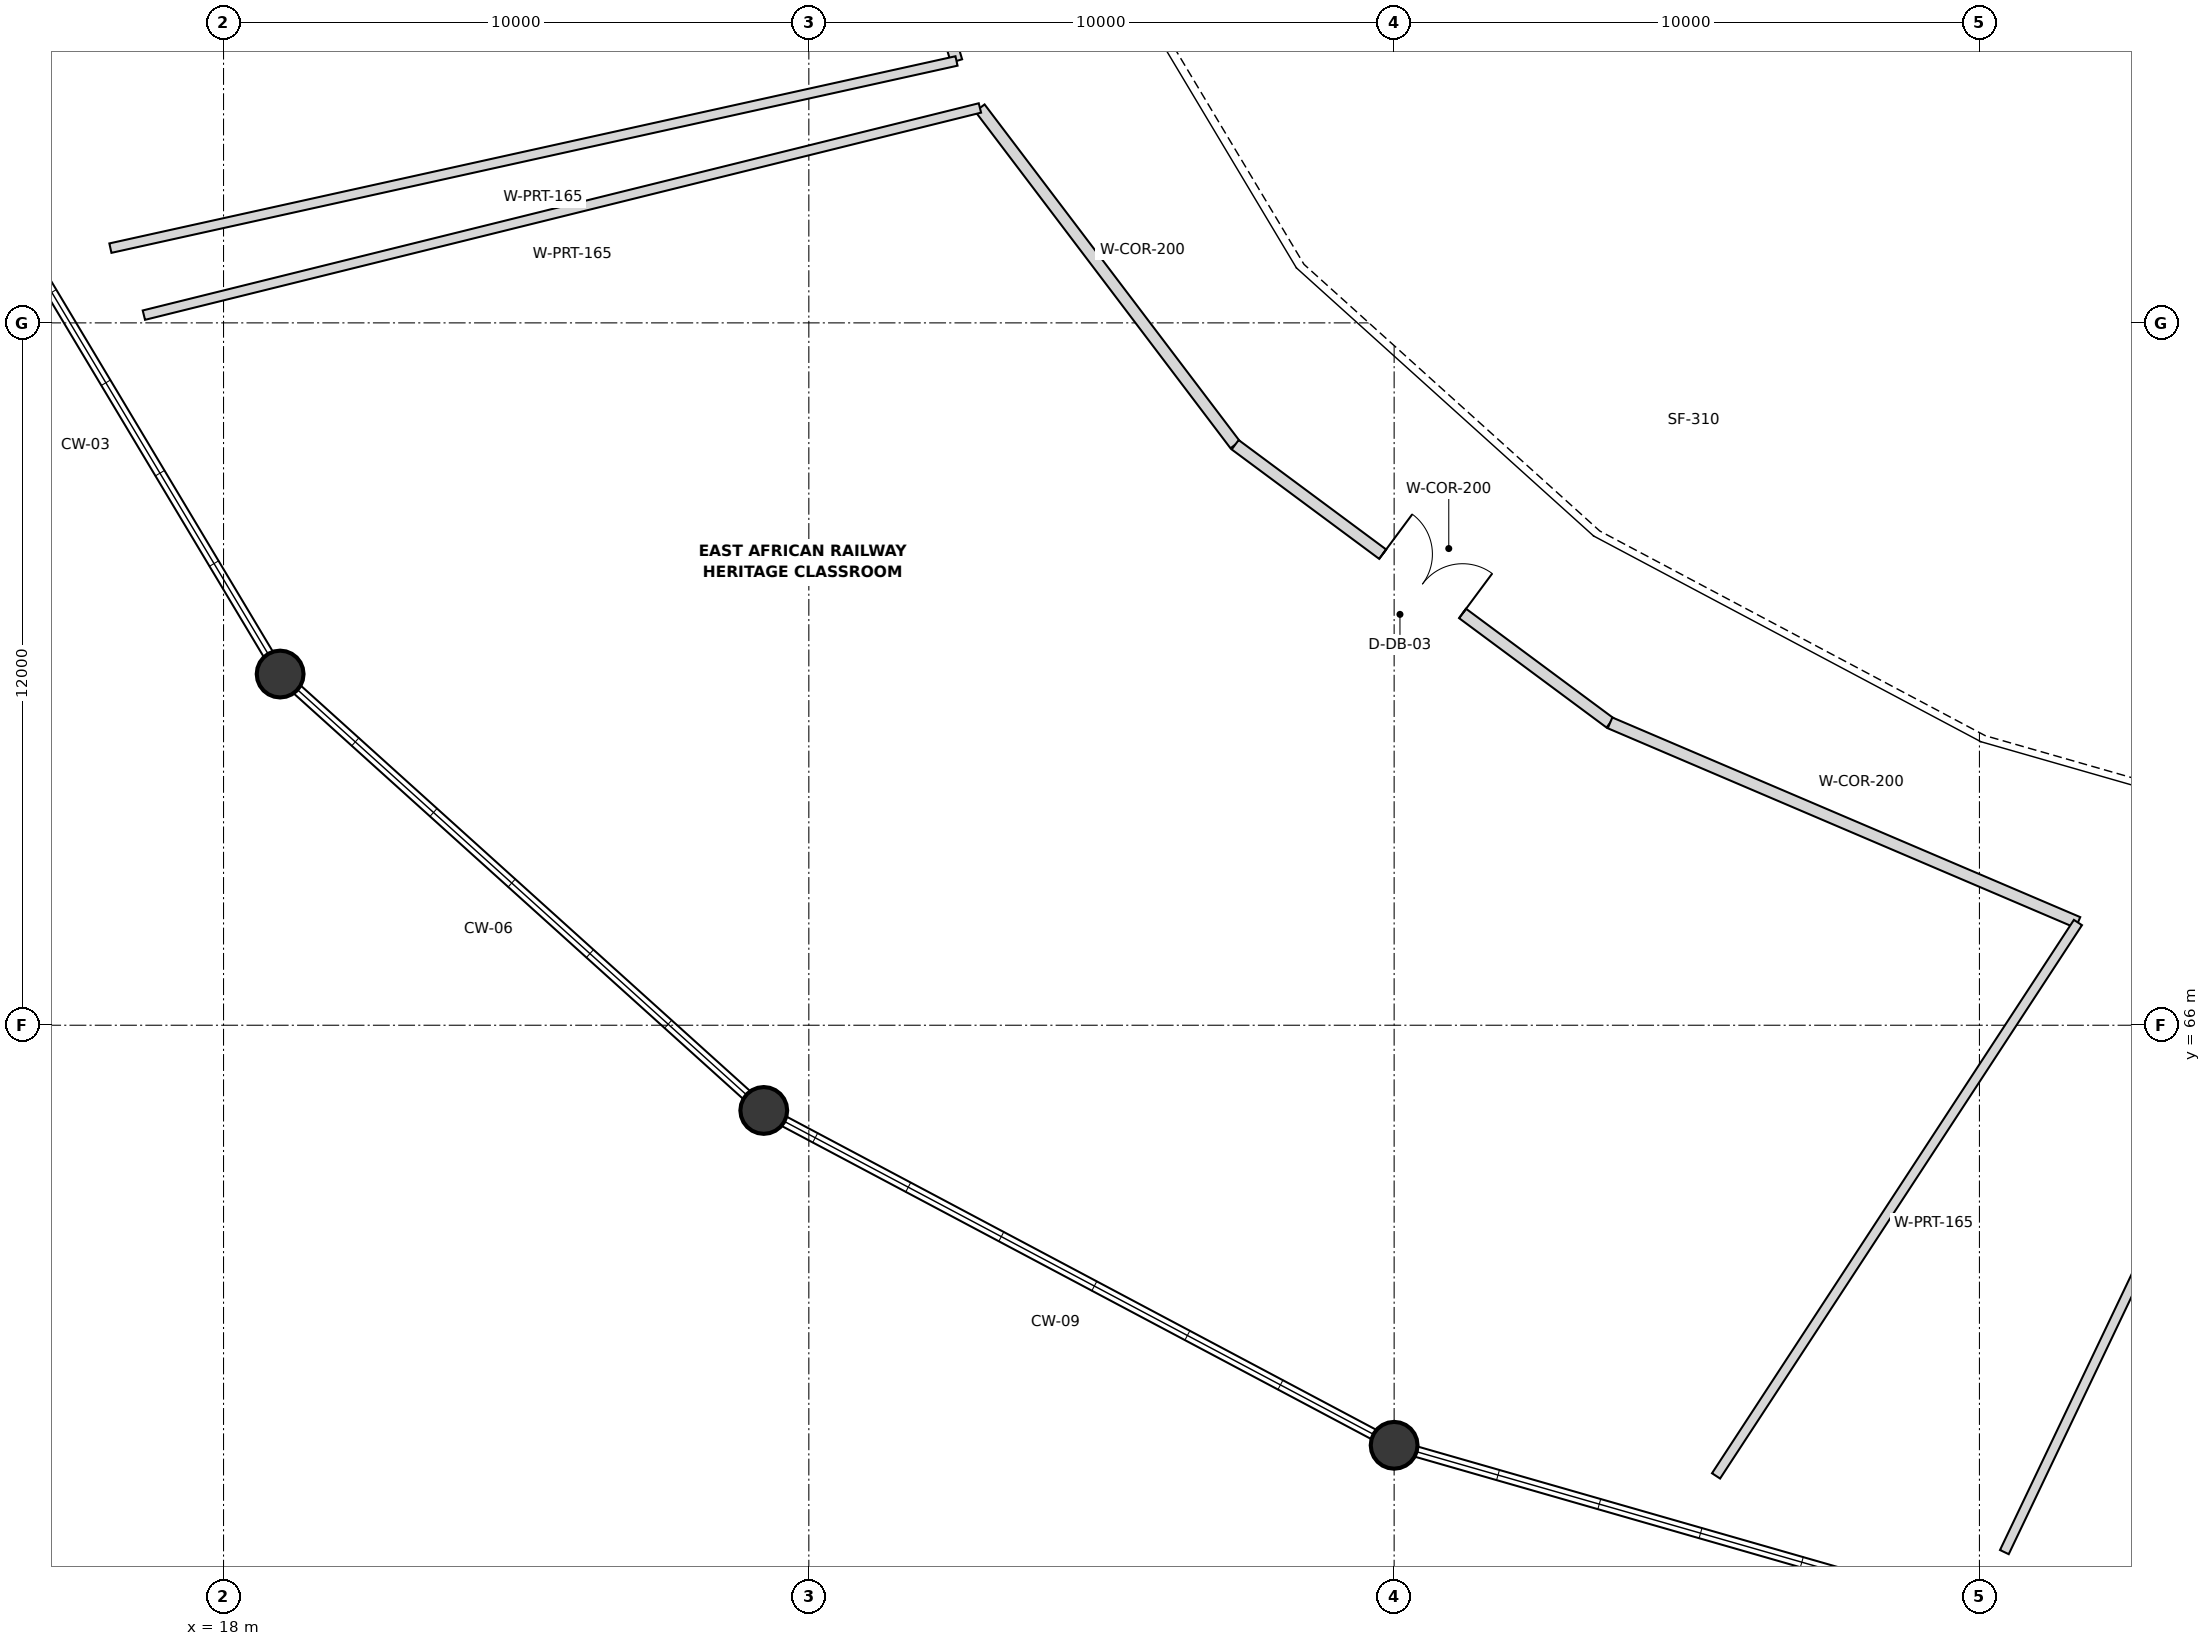
"""IFC4 building model, lengths in metres.
Left out: names, types, materials, properties, quantities, classifications, styles, units other than length and angle.
Written with IfcOpenShell. Run it as: python <this file> out.ifc"""

import sys

from ifc_helpers import new_model, si_unit, direction, frame, frame_2d, origin, origin_2d, place, context, subcontext, project, spatial, rectangle, circle, extrude, element, fill, save


model = new_model("IFC4")
c1 = context("Model", 3, precision=1e-05, world=origin(), true_north=direction((0.0, 1.0)))
c2 = subcontext(c1, "Body", "Model", "MODEL_VIEW")
j1 = project(units=[si_unit("LENGTHUNIT", "METRE"), si_unit("PLANEANGLEUNIT", "RADIAN")], contexts=[c1])
p1 = place(None, origin())
s1 = spatial("IfcSite", under=j1, at=p1, CompositionType="ELEMENT")
p2 = place(p1, origin())
s2 = spatial("IfcBuilding", under=s1, at=p2, CompositionType="ELEMENT")
p3 = place(p2, frame((0.0, 0.0, 9.6)))
s3 = spatial("IfcBuildingStorey", under=s2, at=p3, CompositionType="ELEMENT", Elevation=9.6)
for number, where, z_axis, x_axis in (
    (1, (18.967, 72.0, 0.0), (0.0, 0.0, 1.0), (1.0, 0.0, 0.0)),
    (2, (27.23, 64.544, 0.0), (0.0, 0.0, 1.0), (1.0, 0.0, 0.0)),
    (3, (38.0, 58.823, 0.0), (0.0, 0.0, 1.0), (1.0, 0.0, 0.0)),
):
    element("IfcColumn", number, at=place(p3, frame(where, z_axis=z_axis, x_axis=x_axis)), inside=s3, PredefinedType="COLUMN", context=c2, shape_type="SweptSolid", body=[
        extrude(circle(Radius=0.4, at=origin_2d()), origin(), (0.0, 0.0, 1.0), 4.8),
    ])
p4 = place(p3, frame((28.952, 87.737, 0.0), z_axis=(0.0, 0.0, 1.0), x_axis=(0.286087313327, -0.95820355309, 0.0)))
e4 = element("IfcWall", 4, at=p4, inside=s3, PredefinedType="PARTITIONING", context=c2, shape_type="SweptSolid", body=[
    extrude(rectangle(XDim=5.491, YDim=0.2, at=frame_2d((2.746, 0.0))), origin(), (0.0, 0.0, 1.0), 3.1),
])
p5 = place(p3, frame((30.523, 82.475, 0.0), z_axis=(0.0, 0.0, 1.0), x_axis=(-0.976393417968, -0.215999753124, 0.0)))
e5 = element("IfcWall", 5, at=p5, inside=s3, PredefinedType="PARTITIONING", context=c2, shape_type="SweptSolid", body=[
    extrude(rectangle(XDim=14.806, YDim=0.165, at=frame_2d((7.403, 0.0))), origin(), (0.0, 0.0, 1.0), 3.1),
])
p6 = place(p3, frame((30.923, 81.672, 0.0), z_axis=(0.0, 0.0, 1.0), x_axis=(0.604001559132, -0.79698313443, 0.0)))
e6 = element("IfcWall", 6, at=p6, inside=s3, PredefinedType="PARTITIONING", context=c2, shape_type="SweptSolid", body=[
    extrude(rectangle(XDim=7.22, YDim=0.2, at=frame_2d((3.61, 0.0))), origin(), (0.0, 0.0, 1.0), 3.1),
])
p7 = place(p3, frame((35.284, 75.918, 0.0), z_axis=(0.0, 0.0, 1.0), x_axis=(0.803107951368, -0.595833549282, 0.0)))
e7 = element("IfcWall", 7, at=p7, inside=s3, PredefinedType="PARTITIONING", context=c2, shape_type="SweptSolid", body=[
    extrude(rectangle(XDim=7.975, YDim=0.2, at=frame_2d((3.988, 0.0))), origin(), (0.0, 0.0, 1.0), 3.1),
])
p8 = place(p7, frame((3.138, 0.0, 0.0)))
e8 = element("IfcOpeningElement", 8, at=p8, cuts=e7, PredefinedType="OPENING", context=c2, shape_type="SweptSolid", body=[
    extrude(rectangle(XDim=1.7, YDim=2.2, at=frame_2d((0.85, 1.1))), frame((0.0, 0.11, 0.0), z_axis=(0.0, -1.0, 0.0), x_axis=(1.0, 0.0, 0.0)), (0.0, 0.0, 1.0), 0.22),
])
p9 = place(p3, frame((41.689, 71.166, 0.0), z_axis=(0.0, 0.0, 1.0), x_axis=(0.919765730294, -0.39246783483, 0.0)))
e9 = element("IfcWall", 9, at=p9, inside=s3, PredefinedType="PARTITIONING", context=c2, shape_type="SweptSolid", body=[
    extrude(rectangle(XDim=8.691, YDim=0.2, at=frame_2d((4.346, 0.0))), origin(), (0.0, 0.0, 1.0), 3.1),
])
p10 = place(p3, frame((30.923, 81.672, 0.0), z_axis=(0.0, 0.0, 1.0), x_axis=(-0.97063621591, -0.240552148949, 0.0)))
e10 = element("IfcWall", 10, at=p10, inside=s3, PredefinedType="PARTITIONING", context=c2, shape_type="SweptSolid", body=[
    extrude(rectangle(XDim=14.716, YDim=0.165, at=frame_2d((7.358, 0.0))), origin(), (0.0, 0.0, 1.0), 3.1),
])
p11 = place(p3, frame((49.683, 67.755, 0.0), z_axis=(0.0, 0.0, 1.0), x_axis=(-0.547317485872, -0.836925068127, 0.0)))
e11 = element("IfcWall", 11, at=p11, inside=s3, PredefinedType="PARTITIONING", context=c2, shape_type="SweptSolid", body=[
    extrude(rectangle(XDim=11.297, YDim=0.165, at=frame_2d((5.648, 0.0))), origin(), (0.0, 0.0, 1.0), 3.1),
])
p12 = place(p3, frame((53.123, 66.842, 0.0), z_axis=(0.0, 0.0, 1.0), x_axis=(-0.430636358526, -0.902525526905, 0.0)))
e12 = element("IfcWall", 12, at=p12, inside=s3, PredefinedType="PARTITIONING", context=c2, shape_type="SweptSolid", body=[
    extrude(rectangle(XDim=10.907, YDim=0.165, at=frame_2d((5.454, 0.0))), origin(), (0.0, 0.0, 1.0), 3.1),
])
p13 = place(p8, origin())
e13 = element("IfcDoor", 13, at=p13, inside=s3, OperationType="DOUBLE_DOOR_SINGLE_SWING", PredefinedType="DOOR", context=c2, shape_type="SweptSolid", body=[
    extrude(rectangle(XDim=1.7, YDim=2.2, at=frame_2d((0.85, 1.1))), frame((0.0, 0.025, 0.0), z_axis=(0.0, -1.0, 0.0), x_axis=(1.0, 0.0, 0.0)), (0.0, 0.0, 1.0), 0.05),
])
fill(e8, e13)
save(model, sys.argv[1])
